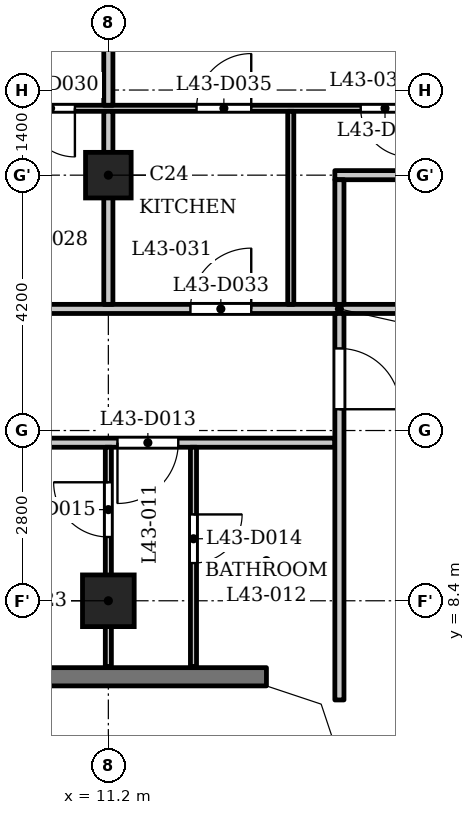
"""IFC4 building model, lengths in metres.
Left out: names, types, materials, properties, quantities, classifications, styles, units other than length and angle.
Written with IfcOpenShell. Run it as: python <this file> out.ifc"""

import sys

from ifc_helpers import new_model, si_unit, direction, frame, frame_2d, origin, origin_2d, place, context, subcontext, project, spatial, polyline, rectangle, outline, extrude, element, fill, save


model = new_model("IFC4")
c1 = context("Model", 3, precision=1e-05, world=origin(), true_north=direction((0.0, 1.0)))
c2 = subcontext(c1, "Body", "Model", "MODEL_VIEW")
j1 = project(units=[si_unit("LENGTHUNIT", "METRE"), si_unit("PLANEANGLEUNIT", "RADIAN")], contexts=[c1])
p1 = place(None, origin())
s1 = spatial("IfcSite", under=j1, at=p1, CompositionType="ELEMENT")
p2 = place(p1, origin())
s2 = spatial("IfcBuilding", under=s1, at=p2, CompositionType="ELEMENT")
p3 = place(p2, frame((0.0, 0.0, 167.6)))
s3 = spatial("IfcBuildingStorey", under=s2, at=p3, CompositionType="ELEMENT", Elevation=167.6)
p4 = place(p3, frame((11.2, 8.4, 0.0), z_axis=(0.0, 0.0, 1.0), x_axis=(1.0, 0.0, 0.0)))
e1 = element("IfcColumn", 1, at=p4, inside=s3, PredefinedType="COLUMN", context=c2, shape_type="SweptSolid", body=[
    extrude(rectangle(XDim=0.85, YDim=0.85, at=origin_2d()), origin(), (0.0, 0.0, 1.0), 3.5),
])
p5 = place(p3, frame((11.2, 15.4, 0.0), z_axis=(0.0, 0.0, 1.0), x_axis=(1.0, 0.0, 0.0)))
e2 = element("IfcColumn", 2, at=p5, inside=s3, PredefinedType="COLUMN", context=c2, shape_type="SweptSolid", body=[
    extrude(rectangle(XDim=0.75, YDim=0.75, at=origin_2d()), origin(), (0.0, 0.0, 1.0), 3.5),
])
p6 = place(p3, frame((-13.8, 7.15, 0.0), z_axis=(0.0, 0.0, 1.0), x_axis=(1.0, 0.0, 0.0)))
e3 = element("IfcWall", 3, at=p6, inside=s3, PredefinedType="SOLIDWALL", context=c2, shape_type="SweptSolid", body=[
    extrude(rectangle(XDim=27.6, YDim=0.3, at=frame_2d((13.8, 0.0))), origin(), (0.0, 0.0, 1.0), 3.2),
])
p7 = place(p6, frame((3.6, 0.0, 1.2)))
e4 = element("IfcOpeningElement", 4, at=p7, cuts=e3, PredefinedType="OPENING", context=c2, shape_type="SweptSolid", body=[
    extrude(rectangle(XDim=3.6, YDim=0.95, at=frame_2d((1.8, 0.475))), frame((0.0, 0.16, 0.0), z_axis=(0.0, -1.0, 0.0), x_axis=(1.0, 0.0, 0.0)), (0.0, 0.0, 1.0), 0.32),
])
p8 = place(p6, frame((9.2, 0.0, 1.2)))
e5 = element("IfcOpeningElement", 5, at=p8, cuts=e3, PredefinedType="OPENING", context=c2, shape_type="SweptSolid", body=[
    extrude(rectangle(XDim=3.6, YDim=0.95, at=frame_2d((1.8, 0.475))), frame((0.0, 0.16, 0.0), z_axis=(0.0, -1.0, 0.0), x_axis=(1.0, 0.0, 0.0)), (0.0, 0.0, 1.0), 0.32),
])
p9 = place(p6, frame((14.8, 0.0, 1.2)))
e6 = element("IfcOpeningElement", 6, at=p9, cuts=e3, PredefinedType="OPENING", context=c2, shape_type="SweptSolid", body=[
    extrude(rectangle(XDim=3.6, YDim=0.95, at=frame_2d((1.8, 0.475))), frame((0.0, 0.16, 0.0), z_axis=(0.0, -1.0, 0.0), x_axis=(1.0, 0.0, 0.0)), (0.0, 0.0, 1.0), 0.32),
])
p10 = place(p6, frame((20.4, 0.0, 1.2)))
e7 = element("IfcOpeningElement", 7, at=p10, cuts=e3, PredefinedType="OPENING", context=c2, shape_type="SweptSolid", body=[
    extrude(rectangle(XDim=3.6, YDim=0.95, at=frame_2d((1.8, 0.475))), frame((0.0, 0.16, 0.0), z_axis=(0.0, -1.0, 0.0), x_axis=(1.0, 0.0, 0.0)), (0.0, 0.0, 1.0), 0.32),
])
p11 = place(p3, frame((-14.925, 11.0, 0.0), z_axis=(0.0, 0.0, 1.0), x_axis=(1.0, 0.0, 0.0)))
e8 = element("IfcWall", 8, at=p11, inside=s3, PredefinedType="PARTITIONING", context=c2, shape_type="SweptSolid", body=[
    extrude(rectangle(XDim=29.85, YDim=0.15, at=frame_2d((14.925, 0.0))), origin(), (0.0, 0.0, 1.0), 3.2),
])
p12 = place(p11, frame((2.475, 0.0, 0.0)))
e9 = element("IfcOpeningElement", 9, at=p12, cuts=e8, PredefinedType="OPENING", context=c2, shape_type="SweptSolid", body=[
    extrude(rectangle(XDim=1.0, YDim=2.1, at=frame_2d((0.5, 1.05))), frame((0.0, 0.085, 0.0), z_axis=(0.0, -1.0, 0.0), x_axis=(1.0, 0.0, 0.0)), (0.0, 0.0, 1.0), 0.17),
])
p13 = place(p11, frame((26.275, 0.0, 0.0)))
e10 = element("IfcOpeningElement", 10, at=p13, cuts=e8, PredefinedType="OPENING", context=c2, shape_type="SweptSolid", body=[
    extrude(rectangle(XDim=1.0, YDim=2.1, at=frame_2d((0.5, 1.05))), frame((0.0, 0.085, 0.0), z_axis=(0.0, -1.0, 0.0), x_axis=(1.0, 0.0, 0.0)), (0.0, 0.0, 1.0), 0.17),
])
p14 = place(p3, frame((-17.4, 13.2, 0.0), z_axis=(0.0, 0.0, 1.0), x_axis=(1.0, 0.0, 0.0)))
e11 = element("IfcWall", 11, at=p14, inside=s3, PredefinedType="PARTITIONING", context=c2, shape_type="SweptSolid", body=[
    extrude(rectangle(XDim=34.8, YDim=0.15, at=frame_2d((17.4, 0.0))), origin(), (0.0, 0.0, 1.0), 3.2),
])
p15 = place(p14, frame((0.25, 0.0, 0.0)))
e12 = element("IfcOpeningElement", 12, at=p15, cuts=e11, PredefinedType="OPENING", context=c2, shape_type="SweptSolid", body=[
    extrude(rectangle(XDim=1.0, YDim=2.1, at=frame_2d((0.5, 1.05))), frame((0.0, 0.085, 0.0), z_axis=(0.0, -1.0, 0.0), x_axis=(1.0, 0.0, 0.0)), (0.0, 0.0, 1.0), 0.17),
])
p16 = place(p14, frame((33.65, 0.0, 0.0)))
e13 = element("IfcOpeningElement", 13, at=p16, cuts=e11, PredefinedType="OPENING", context=c2, shape_type="SweptSolid", body=[
    extrude(rectangle(XDim=1.0, YDim=2.1, at=frame_2d((0.5, 1.05))), frame((0.0, 0.085, 0.0), z_axis=(0.0, -1.0, 0.0), x_axis=(1.0, 0.0, 0.0)), (0.0, 0.0, 1.0), 0.17),
])
p17 = place(p14, frame((10.15, 0.0, 0.0)))
e14 = element("IfcOpeningElement", 14, at=p17, cuts=e11, PredefinedType="OPENING", context=c2, shape_type="SweptSolid", body=[
    extrude(rectangle(XDim=1.0, YDim=2.1, at=frame_2d((0.5, 1.05))), frame((0.0, 0.085, 0.0), z_axis=(0.0, -1.0, 0.0), x_axis=(1.0, 0.0, 0.0)), (0.0, 0.0, 1.0), 0.17),
])
p18 = place(p14, frame((15.75, 0.0, 0.0)))
e15 = element("IfcOpeningElement", 15, at=p18, cuts=e11, PredefinedType="OPENING", context=c2, shape_type="SweptSolid", body=[
    extrude(rectangle(XDim=1.0, YDim=2.1, at=frame_2d((0.5, 1.05))), frame((0.0, 0.085, 0.0), z_axis=(0.0, -1.0, 0.0), x_axis=(1.0, 0.0, 0.0)), (0.0, 0.0, 1.0), 0.17),
])
p19 = place(p14, frame((24.95, 0.0, 0.0)))
e16 = element("IfcOpeningElement", 16, at=p19, cuts=e11, PredefinedType="OPENING", context=c2, shape_type="SweptSolid", body=[
    extrude(rectangle(XDim=1.0, YDim=2.1, at=frame_2d((0.5, 1.05))), frame((0.0, 0.085, 0.0), z_axis=(0.0, -1.0, 0.0), x_axis=(1.0, 0.0, 0.0)), (0.0, 0.0, 1.0), 0.17),
])
p20 = place(p14, frame((29.95, 0.0, 0.0)))
e17 = element("IfcOpeningElement", 17, at=p20, cuts=e11, PredefinedType="OPENING", context=c2, shape_type="SweptSolid", body=[
    extrude(rectangle(XDim=1.0, YDim=2.1, at=frame_2d((0.5, 1.05))), frame((0.0, 0.085, 0.0), z_axis=(0.0, -1.0, 0.0), x_axis=(1.0, 0.0, 0.0)), (0.0, 0.0, 1.0), 0.17),
])
p21 = place(p3, frame((14.925, 15.4, 0.0), z_axis=(0.0, 0.0, 1.0), x_axis=(1.0, 0.0, 0.0)))
e18 = element("IfcWall", 18, at=p21, inside=s3, PredefinedType="PARTITIONING", context=c2, shape_type="SweptSolid", body=[
    extrude(rectangle(XDim=12.559, YDim=0.15, at=frame_2d((6.279, 0.0))), origin(), (0.0, 0.0, 1.0), 3.2),
])
p22 = place(p21, frame((2.575, 0.0, 0.0)))
e19 = element("IfcOpeningElement", 19, at=p22, cuts=e18, PredefinedType="OPENING", context=c2, shape_type="SweptSolid", body=[
    extrude(rectangle(XDim=1.0, YDim=2.1, at=frame_2d((0.5, 1.05))), frame((0.0, 0.085, 0.0), z_axis=(0.0, -1.0, 0.0), x_axis=(1.0, 0.0, 0.0)), (0.0, 0.0, 1.0), 0.17),
])
p23 = place(p3, frame((-16.725, 16.5, 0.0), z_axis=(0.0, 0.0, 1.0), x_axis=(1.0, 0.0, 0.0)))
e20 = element("IfcWall", 20, at=p23, inside=s3, PredefinedType="PARTITIONING", context=c2, shape_type="SweptSolid", body=[
    extrude(rectangle(XDim=33.45, YDim=0.1, at=frame_2d((16.725, 0.0))), origin(), (0.0, 0.0, 1.0), 3.2),
])
p24 = place(p23, frame((0.575, 0.0, 0.0)))
e21 = element("IfcOpeningElement", 21, at=p24, cuts=e20, PredefinedType="OPENING", context=c2, shape_type="SweptSolid", body=[
    extrude(rectangle(XDim=0.8, YDim=2.1, at=frame_2d((0.4, 1.05))), frame((0.0, 0.06, 0.0), z_axis=(0.0, -1.0, 0.0), x_axis=(1.0, 0.0, 0.0)), (0.0, 0.0, 1.0), 0.12),
])
p25 = place(p23, frame((3.225, 0.0, 0.0)))
e22 = element("IfcOpeningElement", 22, at=p25, cuts=e20, PredefinedType="OPENING", context=c2, shape_type="SweptSolid", body=[
    extrude(rectangle(XDim=0.9, YDim=2.1, at=frame_2d((0.45, 1.05))), frame((0.0, 0.06, 0.0), z_axis=(0.0, -1.0, 0.0), x_axis=(1.0, 0.0, 0.0)), (0.0, 0.0, 1.0), 0.12),
])
p26 = place(p23, frame((6.775, 0.0, 0.0)))
e23 = element("IfcOpeningElement", 23, at=p26, cuts=e20, PredefinedType="OPENING", context=c2, shape_type="SweptSolid", body=[
    extrude(rectangle(XDim=0.9, YDim=2.1, at=frame_2d((0.45, 1.05))), frame((0.0, 0.06, 0.0), z_axis=(0.0, -1.0, 0.0), x_axis=(1.0, 0.0, 0.0)), (0.0, 0.0, 1.0), 0.12),
])
p27 = place(p23, frame((8.825, 0.0, 0.0)))
e24 = element("IfcOpeningElement", 24, at=p27, cuts=e20, PredefinedType="OPENING", context=c2, shape_type="SweptSolid", body=[
    extrude(rectangle(XDim=0.9, YDim=2.1, at=frame_2d((0.45, 1.05))), frame((0.0, 0.06, 0.0), z_axis=(0.0, -1.0, 0.0), x_axis=(1.0, 0.0, 0.0)), (0.0, 0.0, 1.0), 0.12),
])
p28 = place(p23, frame((20.775, 0.0, 0.0)))
e25 = element("IfcOpeningElement", 25, at=p28, cuts=e20, PredefinedType="OPENING", context=c2, shape_type="SweptSolid", body=[
    extrude(rectangle(XDim=0.8, YDim=2.1, at=frame_2d((0.4, 1.05))), frame((0.0, 0.06, 0.0), z_axis=(0.0, -1.0, 0.0), x_axis=(1.0, 0.0, 0.0)), (0.0, 0.0, 1.0), 0.12),
])
p29 = place(p23, frame((17.325, 0.0, 0.0)))
e26 = element("IfcOpeningElement", 26, at=p29, cuts=e20, PredefinedType="OPENING", context=c2, shape_type="SweptSolid", body=[
    extrude(rectangle(XDim=0.9, YDim=2.1, at=frame_2d((0.45, 1.05))), frame((0.0, 0.06, 0.0), z_axis=(0.0, -1.0, 0.0), x_axis=(1.0, 0.0, 0.0)), (0.0, 0.0, 1.0), 0.12),
])
p30 = place(p23, frame((12.375, 0.0, 0.0)))
e27 = element("IfcOpeningElement", 27, at=p30, cuts=e20, PredefinedType="OPENING", context=c2, shape_type="SweptSolid", body=[
    extrude(rectangle(XDim=0.9, YDim=2.1, at=frame_2d((0.45, 1.05))), frame((0.0, 0.06, 0.0), z_axis=(0.0, -1.0, 0.0), x_axis=(1.0, 0.0, 0.0)), (0.0, 0.0, 1.0), 0.12),
])
p31 = place(p23, frame((14.425, 0.0, 0.0)))
e28 = element("IfcOpeningElement", 28, at=p31, cuts=e20, PredefinedType="OPENING", context=c2, shape_type="SweptSolid", body=[
    extrude(rectangle(XDim=0.9, YDim=2.1, at=frame_2d((0.45, 1.05))), frame((0.0, 0.06, 0.0), z_axis=(0.0, -1.0, 0.0), x_axis=(1.0, 0.0, 0.0)), (0.0, 0.0, 1.0), 0.12),
])
p32 = place(p23, frame((26.575, 0.0, 0.0)))
e29 = element("IfcOpeningElement", 29, at=p32, cuts=e20, PredefinedType="OPENING", context=c2, shape_type="SweptSolid", body=[
    extrude(rectangle(XDim=0.8, YDim=2.1, at=frame_2d((0.4, 1.05))), frame((0.0, 0.06, 0.0), z_axis=(0.0, -1.0, 0.0), x_axis=(1.0, 0.0, 0.0)), (0.0, 0.0, 1.0), 0.12),
])
p33 = place(p23, frame((23.775, 0.0, 0.0)))
e30 = element("IfcOpeningElement", 30, at=p33, cuts=e20, PredefinedType="OPENING", context=c2, shape_type="SweptSolid", body=[
    extrude(rectangle(XDim=0.9, YDim=2.1, at=frame_2d((0.45, 1.05))), frame((0.0, 0.06, 0.0), z_axis=(0.0, -1.0, 0.0), x_axis=(1.0, 0.0, 0.0)), (0.0, 0.0, 1.0), 0.12),
])
p34 = place(p23, frame((32.075, 0.0, 0.0)))
e31 = element("IfcOpeningElement", 31, at=p34, cuts=e20, PredefinedType="OPENING", context=c2, shape_type="SweptSolid", body=[
    extrude(rectangle(XDim=0.8, YDim=2.1, at=frame_2d((0.4, 1.05))), frame((0.0, 0.06, 0.0), z_axis=(0.0, -1.0, 0.0), x_axis=(1.0, 0.0, 0.0)), (0.0, 0.0, 1.0), 0.12),
])
p35 = place(p23, frame((29.375, 0.0, 0.0)))
e32 = element("IfcOpeningElement", 32, at=p35, cuts=e20, PredefinedType="OPENING", context=c2, shape_type="SweptSolid", body=[
    extrude(rectangle(XDim=0.9, YDim=2.1, at=frame_2d((0.45, 1.05))), frame((0.0, 0.06, 0.0), z_axis=(0.0, -1.0, 0.0), x_axis=(1.0, 0.0, 0.0)), (0.0, 0.0, 1.0), 0.12),
])
p36 = place(p3, frame((11.2, 7.32, 0.0), z_axis=(0.0, 0.0, 1.0), x_axis=(0.0, 1.0, 0.0)))
e33 = element("IfcWall", 33, at=p36, inside=s3, PredefinedType="PARTITIONING", context=c2, shape_type="SweptSolid", body=[
    extrude(rectangle(XDim=3.605, YDim=0.1, at=frame_2d((1.802, 0.0))), origin(), (0.0, 0.0, 1.0), 3.2),
])
p37 = place(p36, frame((2.129, 0.0, 0.0)))
e34 = element("IfcOpeningElement", 34, at=p37, cuts=e33, PredefinedType="OPENING", context=c2, shape_type="SweptSolid", body=[
    extrude(rectangle(XDim=0.9, YDim=2.1, at=frame_2d((0.45, 1.05))), frame((0.0, 0.06, 0.0), z_axis=(0.0, -1.0, 0.0), x_axis=(1.0, 0.0, 0.0)), (0.0, 0.0, 1.0), 0.12),
])
p38 = place(p3, frame((11.2, 13.275, 0.0), z_axis=(0.0, 0.0, 1.0), x_axis=(0.0, 1.0, 0.0)))
e35 = element("IfcWall", 35, at=p38, inside=s3, PredefinedType="PARTITIONING", context=c2, shape_type="SweptSolid", body=[
    extrude(rectangle(XDim=3.175, YDim=0.15, at=frame_2d((1.587, 0.0))), origin(), (0.0, 0.0, 1.0), 3.2),
])
p39 = place(p3, frame((11.2, 16.55, 0.0), z_axis=(0.0, 0.0, 1.0), x_axis=(0.0, 1.0, 0.0)))
e36 = element("IfcWall", 36, at=p39, inside=s3, PredefinedType="PARTITIONING", context=c2, shape_type="SweptSolid", body=[
    extrude(rectangle(XDim=6.33, YDim=0.15, at=frame_2d((3.165, 0.0))), origin(), (0.0, 0.0, 1.0), 3.2),
])
p40 = place(p3, frame((12.6, 7.32, 0.0), z_axis=(0.0, 0.0, 1.0), x_axis=(0.0, 1.0, 0.0)))
e37 = element("IfcWall", 37, at=p40, inside=s3, PredefinedType="PARTITIONING", context=c2, shape_type="SweptSolid", body=[
    extrude(rectangle(XDim=3.605, YDim=0.1, at=frame_2d((1.802, 0.0))), origin(), (0.0, 0.0, 1.0), 3.2),
])
p41 = place(p40, frame((1.7, 0.0, 0.0)))
e38 = element("IfcOpeningElement", 38, at=p41, cuts=e37, PredefinedType="OPENING", context=c2, shape_type="SweptSolid", body=[
    extrude(rectangle(XDim=0.8, YDim=2.1, at=frame_2d((0.4, 1.05))), frame((0.0, 0.06, 0.0), z_axis=(0.0, -1.0, 0.0), x_axis=(1.0, 0.0, 0.0)), (0.0, 0.0, 1.0), 0.12),
])
p42 = place(p3, frame((14.2, 13.275, 0.0), z_axis=(0.0, 0.0, 1.0), x_axis=(0.0, 1.0, 0.0)))
e39 = element("IfcWall", 39, at=p42, inside=s3, PredefinedType="PARTITIONING", context=c2, shape_type="SweptSolid", body=[
    extrude(rectangle(XDim=3.175, YDim=0.1, at=frame_2d((1.587, 0.0))), origin(), (0.0, 0.0, 1.0), 3.2),
])
p43 = place(p3, frame((15.0, 6.769, 0.0), z_axis=(0.0, 0.0, 1.0), x_axis=(0.0, 1.0, 0.0)))
e40 = element("IfcWall", 40, at=p43, inside=s3, PredefinedType="PARTITIONING", context=c2, shape_type="SweptSolid", body=[
    extrude(rectangle(XDim=6.356, YDim=0.15, at=frame_2d((3.178, 0.0))), origin(), (0.0, 0.0, 1.0), 3.2),
])
p44 = place(p43, frame((4.781, 0.0, 0.0)))
e41 = element("IfcOpeningElement", 41, at=p44, cuts=e40, PredefinedType="OPENING", context=c2, shape_type="SweptSolid", body=[
    extrude(rectangle(XDim=1.0, YDim=2.1, at=frame_2d((0.5, 1.05))), frame((0.0, 0.085, 0.0), z_axis=(0.0, -1.0, 0.0), x_axis=(1.0, 0.0, 0.0)), (0.0, 0.0, 1.0), 0.17),
])
p45 = place(p3, frame((15.0, 13.275, 0.0), z_axis=(0.0, 0.0, 1.0), x_axis=(0.0, 1.0, 0.0)))
e42 = element("IfcWall", 42, at=p45, inside=s3, PredefinedType="PARTITIONING", context=c2, shape_type="SweptSolid", body=[
    extrude(rectangle(XDim=2.05, YDim=0.15, at=frame_2d((1.025, 0.0))), origin(), (0.0, 0.0, 1.0), 3.2),
])
p46 = place(p3, origin())
e43 = element("IfcWall", 43, at=p46, inside=s3, PredefinedType="SOLIDWALL", context=c2, shape_type="SweptSolid", body=[
    extrude(outline(polyline([(14.937, 6.937), (13.849, 7.3), (13.8, 7.3), (13.8, 7.0), (14.7, 6.7), (15.0, 5.8), (15.3, 5.8), (15.3, 5.849), (14.937, 6.937)])), origin(), (0.0, 0.0, 1.0), 3.2),
])
p47 = place(p44, origin())
e44 = element("IfcDoor", 44, at=p47, inside=s3, OperationType="SINGLE_SWING_LEFT", PredefinedType="DOOR", context=c2, shape_type="SweptSolid", body=[
    extrude(rectangle(XDim=1.0, YDim=2.1, at=frame_2d((0.5, 1.05))), frame((0.0, 0.025, 0.0), z_axis=(0.0, -1.0, 0.0), x_axis=(1.0, 0.0, 0.0)), (0.0, 0.0, 1.0), 0.05),
])
fill(e41, e44)
p48 = place(p13, origin())
e45 = element("IfcDoor", 45, at=p48, inside=s3, OperationType="SINGLE_SWING_LEFT", PredefinedType="DOOR", context=c2, shape_type="SweptSolid", body=[
    extrude(rectangle(XDim=1.0, YDim=2.1, at=frame_2d((0.5, 1.05))), frame((0.0, 0.025, 0.0), z_axis=(0.0, -1.0, 0.0), x_axis=(1.0, 0.0, 0.0)), (0.0, 0.0, 1.0), 0.05),
])
fill(e10, e45)
p49 = place(p41, origin())
e46 = element("IfcDoor", 46, at=p49, inside=s3, OperationType="SINGLE_SWING_RIGHT", PredefinedType="DOOR", context=c2, shape_type="SweptSolid", body=[
    extrude(rectangle(XDim=0.8, YDim=2.1, at=frame_2d((0.4, 1.05))), frame((0.0, 0.025, 0.0), z_axis=(0.0, -1.0, 0.0), x_axis=(1.0, 0.0, 0.0)), (0.0, 0.0, 1.0), 0.05),
])
fill(e38, e46)
p50 = place(p37, origin())
e47 = element("IfcDoor", 47, at=p50, inside=s3, OperationType="SINGLE_SWING_LEFT", PredefinedType="DOOR", context=c2, shape_type="SweptSolid", body=[
    extrude(rectangle(XDim=0.9, YDim=2.1, at=frame_2d((0.45, 1.05))), frame((0.0, 0.025, 0.0), z_axis=(0.0, -1.0, 0.0), x_axis=(1.0, 0.0, 0.0)), (0.0, 0.0, 1.0), 0.05),
])
fill(e34, e47)
p51 = place(p32, origin())
e48 = element("IfcDoor", 48, at=p51, inside=s3, OperationType="SINGLE_SWING_RIGHT", PredefinedType="DOOR", context=c2, shape_type="SweptSolid", body=[
    extrude(rectangle(XDim=0.8, YDim=2.1, at=frame_2d((0.4, 1.05))), frame((0.0, 0.025, 0.0), z_axis=(0.0, -1.0, 0.0), x_axis=(1.0, 0.0, 0.0)), (0.0, 0.0, 1.0), 0.05),
])
fill(e29, e48)
p52 = place(p20, origin())
e49 = element("IfcDoor", 49, at=p52, inside=s3, OperationType="SINGLE_SWING_LEFT", PredefinedType="DOOR", context=c2, shape_type="SweptSolid", body=[
    extrude(rectangle(XDim=1.0, YDim=2.1, at=frame_2d((0.5, 1.05))), frame((0.0, 0.025, 0.0), z_axis=(0.0, -1.0, 0.0), x_axis=(1.0, 0.0, 0.0)), (0.0, 0.0, 1.0), 0.05),
])
fill(e17, e49)
p53 = place(p34, origin())
e50 = element("IfcDoor", 50, at=p53, inside=s3, OperationType="SINGLE_SWING_RIGHT", PredefinedType="DOOR", context=c2, shape_type="SweptSolid", body=[
    extrude(rectangle(XDim=0.8, YDim=2.1, at=frame_2d((0.4, 1.05))), frame((0.0, 0.025, 0.0), z_axis=(0.0, -1.0, 0.0), x_axis=(1.0, 0.0, 0.0)), (0.0, 0.0, 1.0), 0.05),
])
fill(e31, e50)
p54 = place(p35, origin())
e51 = element("IfcDoor", 51, at=p54, inside=s3, OperationType="SINGLE_SWING_LEFT", PredefinedType="DOOR", context=c2, shape_type="SweptSolid", body=[
    extrude(rectangle(XDim=0.9, YDim=2.1, at=frame_2d((0.45, 1.05))), frame((0.0, 0.025, 0.0), z_axis=(0.0, -1.0, 0.0), x_axis=(1.0, 0.0, 0.0)), (0.0, 0.0, 1.0), 0.05),
])
fill(e32, e51)
save(model, sys.argv[1])
